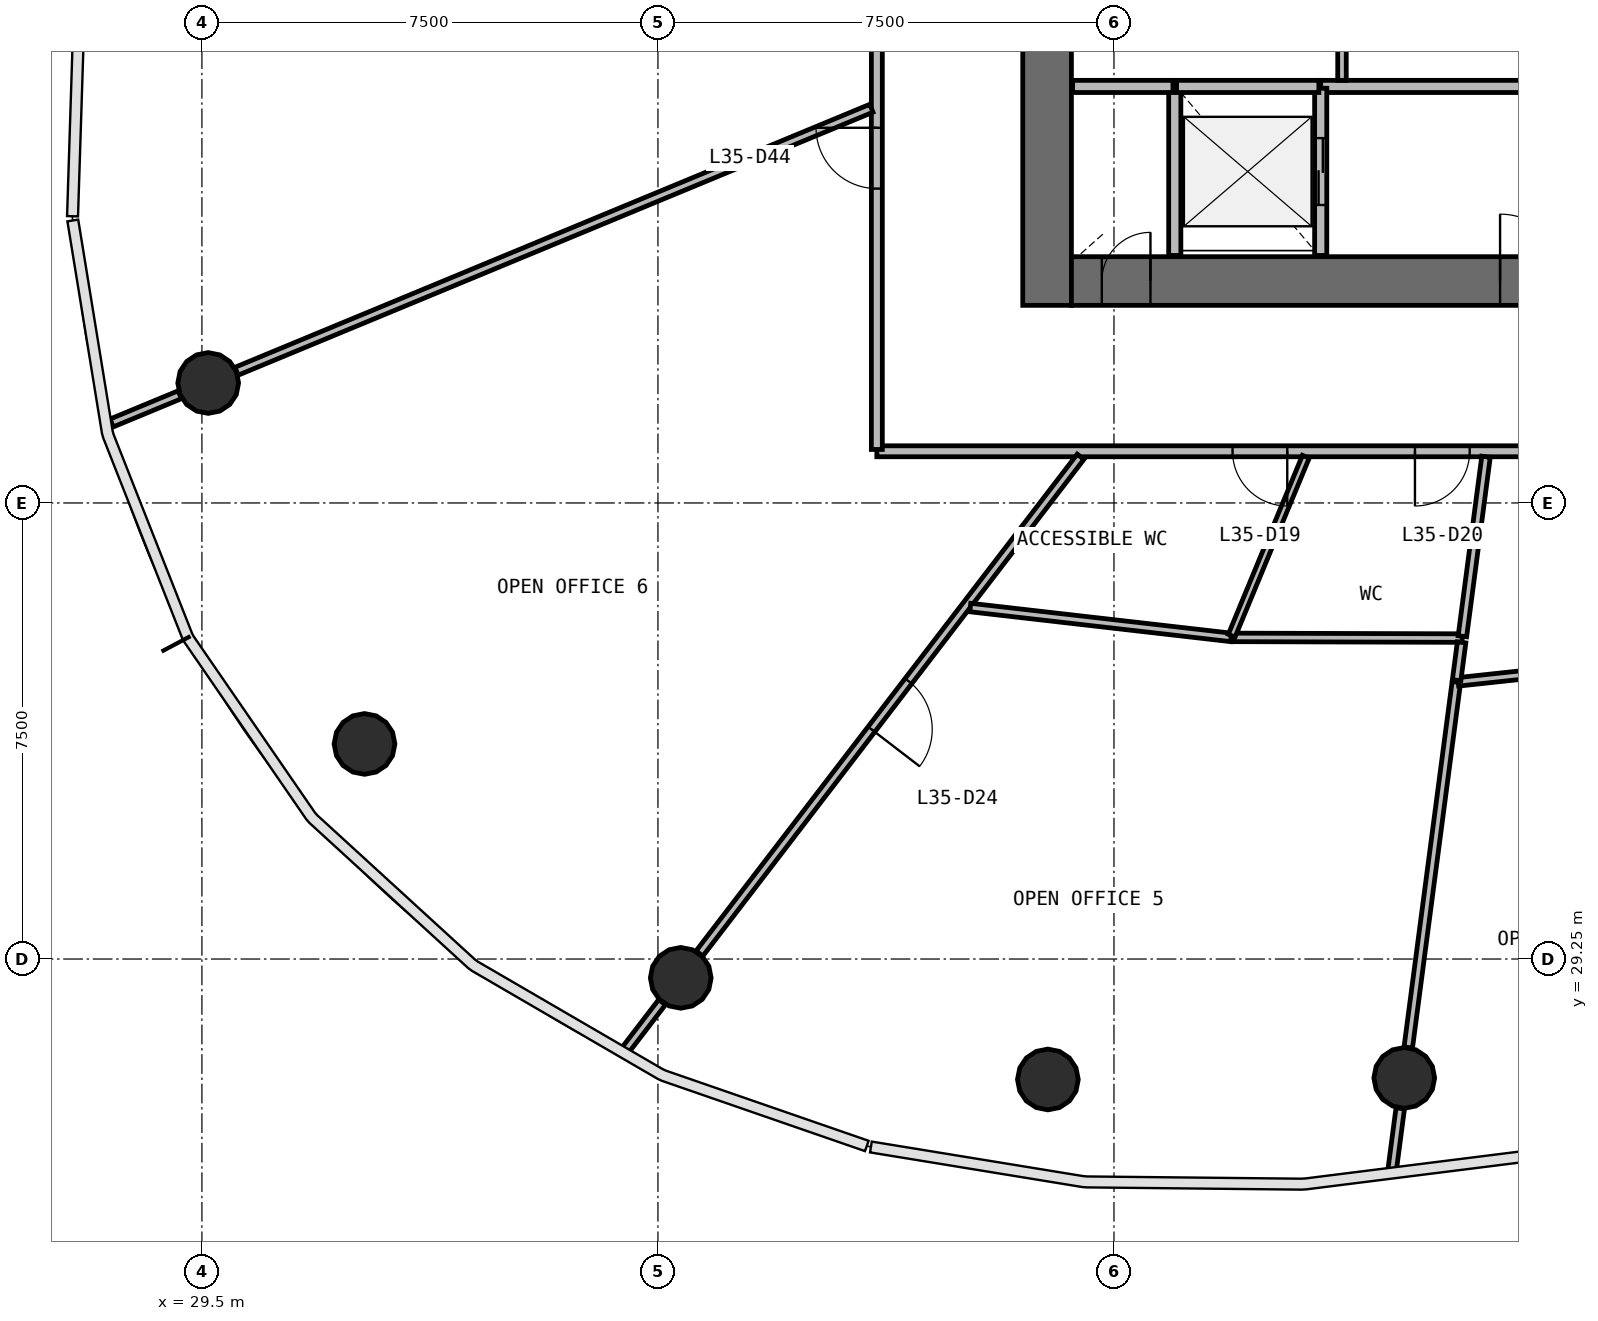
"""IFC4 building model, lengths in metres.
Left out: names, types, materials, properties, quantities, classifications, styles, units other than length and angle.
Written with IfcOpenShell. Run it as: python <this file> out.ifc"""

import sys

from ifc_helpers import new_model, si_unit, direction, frame, frame_2d, origin, origin_2d, place, context, subcontext, project, spatial, rectangle, circle, extrude, source, transform, mapped, element, fill, save


model = new_model("IFC4")
c1 = context("Model", 3, precision=1e-05, world=origin(), true_north=direction((0.0, 1.0)))
c2 = subcontext(c1, "Body", "Model", "MODEL_VIEW")
j1 = project(units=[si_unit("LENGTHUNIT", "METRE"), si_unit("PLANEANGLEUNIT", "RADIAN")], contexts=[c1])
p1 = place(None, origin())
s1 = spatial("IfcSite", under=j1, at=p1, CompositionType="ELEMENT")
p2 = place(p1, origin())
s2 = spatial("IfcBuilding", under=s1, at=p2, CompositionType="ELEMENT")
p3 = place(p2, frame((0.0, 0.0, 148.7)))
s3 = spatial("IfcBuildingStorey", under=s2, at=p3, CompositionType="ELEMENT", Elevation=148.7)
p4 = place(p3, frame((43.4, 56.0, 0.0), z_axis=(0.0, 0.0, 1.0), x_axis=(0.0, -1.0, 0.0)))
e1 = element("IfcWall", 1, at=p4, inside=s3, PredefinedType="SHEAR", context=c2, shape_type="SweptSolid", body=[
    extrude(rectangle(XDim=16.0, YDim=0.8, at=frame_2d((8.0, 0.0))), origin(), (0.0, 0.0, 1.0), 3.9),
])
p5 = place(p4, frame((7.1, 0.0, 0.0)))
e2 = element("IfcOpeningElement", 2, at=p5, cuts=e1, PredefinedType="OPENING", context=c2, shape_type="SweptSolid", body=[
    extrude(rectangle(XDim=1.8, YDim=2.1, at=frame_2d((0.9, 1.05))), frame((0.0, 0.41, 0.0), z_axis=(0.0, -1.0, 0.0), x_axis=(1.0, 0.0, 0.0)), (0.0, 0.0, 1.0), 0.82),
])
p6 = place(p3, frame((43.8, 40.4, 0.0), z_axis=(0.0, 0.0, 1.0), x_axis=(1.0, 0.0, 0.0)))
e3 = element("IfcWall", 3, at=p6, inside=s3, PredefinedType="SHEAR", context=c2, shape_type="SweptSolid", body=[
    extrude(rectangle(XDim=16.4, YDim=0.8, at=frame_2d((8.2, 0.0))), origin(), (0.0, 0.0, 1.0), 3.9),
])
p7 = place(p6, frame((10.1, 0.0, 0.0)))
e4 = element("IfcOpeningElement", 4, at=p7, cuts=e3, PredefinedType="OPENING", context=c2, shape_type="SweptSolid", body=[
    extrude(rectangle(XDim=1.2, YDim=2.1, at=frame_2d((0.6, 1.05))), frame((0.0, 0.41, 0.0), z_axis=(0.0, -1.0, 0.0), x_axis=(1.0, 0.0, 0.0)), (0.0, 0.0, 1.0), 0.82),
])
p8 = place(p6, frame((7.05, 0.0, 0.0)))
e5 = element("IfcOpeningElement", 5, at=p8, cuts=e3, PredefinedType="OPENING", context=c2, shape_type="SweptSolid", body=[
    extrude(rectangle(XDim=1.1, YDim=2.1, at=frame_2d((0.55, 1.05))), frame((0.0, 0.41, 0.0), z_axis=(0.0, -1.0, 0.0), x_axis=(1.0, 0.0, 0.0)), (0.0, 0.0, 1.0), 0.82),
])
p9 = place(p6, frame((0.5, 0.0, 0.0)))
e6 = element("IfcOpeningElement", 6, at=p9, cuts=e3, PredefinedType="OPENING", context=c2, shape_type="SweptSolid", body=[
    extrude(rectangle(XDim=0.8, YDim=2.1, at=frame_2d((0.4, 1.05))), frame((0.0, 0.41, 0.0), z_axis=(0.0, -1.0, 0.0), x_axis=(1.0, 0.0, 0.0)), (0.0, 0.0, 1.0), 0.82),
])
m1 = source(origin(), c2, "Body", "SweptSolid", [
    extrude(circle(Radius=0.5, at=origin_2d()), origin(), (0.0, 0.0, 1.0), 3.9),
])
for number, where, z_axis, x_axis in (
    (7, (29.603, 38.723, 0.0), (0.0, 0.0, 1.0), (1.0, 0.0, 0.0)),
    (8, (32.174, 32.787, 0.0), (0.0, 0.0, 1.0), (1.0, 0.0, 0.0)),
    (9, (37.375, 28.94, 0.0), (0.0, 0.0, 1.0), (1.0, 0.0, 0.0)),
    (10, (43.413, 27.269, 0.0), (0.0, 0.0, 1.0), (1.0, 0.0, 0.0)),
    (11, (49.274, 27.295, 0.0), (0.0, 0.0, 1.0), (1.0, 0.0, 0.0)),
):
    element("IfcColumn", number, at=place(p3, frame(where, z_axis=z_axis, x_axis=x_axis)), inside=s3, PredefinedType="COLUMN", context=c2, shape_type="MappedRepresentation", body=[
        mapped(m1, transform((0.0, 0.0, 0.0), scale=1.0)),
    ])
p10 = place(p3, frame((52.7, 43.6, 0.0), z_axis=(0.0, 0.0, 1.0), x_axis=(-1.0, 0.0, 0.0)))
e12 = element("IfcWall", 12, at=p10, inside=s3, PredefinedType="SOLIDWALL", context=c2, shape_type="SweptSolid", body=[
    extrude(rectangle(XDim=4.8, YDim=0.2, at=frame_2d((2.4, 0.0))), origin(), (0.0, 0.0, 1.0), 3.58),
])
p11 = place(p3, frame((45.5, 43.6, 0.0), z_axis=(0.0, 0.0, 1.0), x_axis=(0.0, -1.0, 0.0)))
e13 = element("IfcWall", 13, at=p11, inside=s3, PredefinedType="SOLIDWALL", context=c2, shape_type="SweptSolid", body=[
    extrude(rectangle(XDim=2.78, YDim=0.2, at=frame_2d((1.39, 0.0))), origin(), (0.0, 0.0, 1.0), 3.58),
])
p12 = place(p3, frame((47.9, 40.82, 0.0), z_axis=(0.0, 0.0, 1.0), x_axis=(0.0, 1.0, 0.0)))
e14 = element("IfcWall", 14, at=p12, inside=s3, PredefinedType="SOLIDWALL", context=c2, shape_type="SweptSolid", body=[
    extrude(rectangle(XDim=2.75, YDim=0.2, at=frame_2d((1.375, 0.0))), origin(), (0.0, 0.0, 1.0), 3.58),
])
p13 = place(p12, frame((0.83, 0.0, 0.0)))
e15 = element("IfcOpeningElement", 15, at=p13, cuts=e14, PredefinedType="OPENING", context=c2, shape_type="SweptSolid", body=[
    extrude(rectangle(XDim=1.1, YDim=2.1, at=frame_2d((0.55, 1.05))), frame((0.0, 0.11, 0.0), z_axis=(0.0, -1.0, 0.0), x_axis=(1.0, 0.0, 0.0)), (0.0, 0.0, 1.0), 0.22),
])
p14 = place(p3, frame((47.87, 43.6, 0.0), z_axis=(0.0, 0.0, 1.0), x_axis=(-1.0, 0.0, 0.0)))
e16 = element("IfcWall", 16, at=p14, inside=s3, PredefinedType="SOLIDWALL", context=c2, shape_type="SweptSolid", body=[
    extrude(rectangle(XDim=2.34, YDim=0.2, at=frame_2d((1.17, 0.0))), origin(), (0.0, 0.0, 1.0), 3.58),
])
p15 = place(p3, frame((45.47, 43.6, 0.0), z_axis=(0.0, 0.0, 1.0), x_axis=(-1.0, 0.0, 0.0)))
e17 = element("IfcWall", 17, at=p15, inside=s3, PredefinedType="SOLIDWALL", context=c2, shape_type="SweptSolid", body=[
    extrude(rectangle(XDim=1.65, YDim=0.2, at=frame_2d((0.825, 0.0))), origin(), (0.0, 0.0, 1.0), 3.58),
])
p16 = place(p3, frame((63.4, 37.6, 0.0), z_axis=(0.0, 0.0, 1.0), x_axis=(-1.0, 0.0, 0.0)))
e18 = element("IfcWall", 18, at=p16, inside=s3, PredefinedType="PARTITIONING", context=c2, shape_type="SweptSolid", body=[
    extrude(rectangle(XDim=22.8, YDim=0.18, at=frame_2d((11.4, 0.0))), origin(), (0.0, 0.0, 1.0), 2.88),
])
p17 = place(p16, frame((16.05, 0.0, 0.0)))
e19 = element("IfcOpeningElement", 19, at=p17, cuts=e18, PredefinedType="OPENING", context=c2, shape_type="SweptSolid", body=[
    extrude(rectangle(XDim=0.9, YDim=2.1, at=frame_2d((0.45, 1.05))), frame((0.0, 0.1, 0.0), z_axis=(0.0, -1.0, 0.0), x_axis=(1.0, 0.0, 0.0)), (0.0, 0.0, 1.0), 0.2),
])
p18 = place(p16, frame((13.05, 0.0, 0.0)))
e20 = element("IfcOpeningElement", 20, at=p18, cuts=e18, PredefinedType="OPENING", context=c2, shape_type="SweptSolid", body=[
    extrude(rectangle(XDim=0.9, YDim=2.1, at=frame_2d((0.45, 1.05))), frame((0.0, 0.1, 0.0), z_axis=(0.0, -1.0, 0.0), x_axis=(1.0, 0.0, 0.0)), (0.0, 0.0, 1.0), 0.2),
])
p19 = place(p16, frame((10.95, 0.0, 0.0)))
e21 = element("IfcOpeningElement", 21, at=p19, cuts=e18, PredefinedType="OPENING", context=c2, shape_type="SweptSolid", body=[
    extrude(rectangle(XDim=1.0, YDim=2.1, at=frame_2d((0.5, 1.05))), frame((0.0, 0.1, 0.0), z_axis=(0.0, -1.0, 0.0), x_axis=(1.0, 0.0, 0.0)), (0.0, 0.0, 1.0), 0.2),
])
p20 = place(p16, frame((5.75, 0.0, 0.0)))
e22 = element("IfcOpeningElement", 22, at=p20, cuts=e18, PredefinedType="OPENING", context=c2, shape_type="SweptSolid", body=[
    extrude(rectangle(XDim=1.0, YDim=2.1, at=frame_2d((0.5, 1.05))), frame((0.0, 0.1, 0.0), z_axis=(0.0, -1.0, 0.0), x_axis=(1.0, 0.0, 0.0)), (0.0, 0.0, 1.0), 0.2),
])
p21 = place(p3, frame((40.6, 37.63, 0.0), z_axis=(0.0, 0.0, 1.0), x_axis=(0.0, 1.0, 0.0)))
e23 = element("IfcWall", 23, at=p21, inside=s3, PredefinedType="PARTITIONING", context=c2, shape_type="SweptSolid", body=[
    extrude(rectangle(XDim=20.74, YDim=0.18, at=frame_2d((10.37, 0.0))), origin(), (0.0, 0.0, 1.0), 2.88),
])
p22 = place(p21, frame((15.49, 0.0, 0.0)))
e24 = element("IfcOpeningElement", 24, at=p22, cuts=e23, PredefinedType="OPENING", context=c2, shape_type="SweptSolid", body=[
    extrude(rectangle(XDim=1.0, YDim=2.1, at=frame_2d((0.5, 1.05))), frame((0.0, 0.1, 0.0), z_axis=(0.0, -1.0, 0.0), x_axis=(1.0, 0.0, 0.0)), (0.0, 0.0, 1.0), 0.2),
])
p23 = place(p21, frame((12.09, 0.0, 0.0)))
e25 = element("IfcOpeningElement", 25, at=p23, cuts=e23, PredefinedType="OPENING", context=c2, shape_type="SweptSolid", body=[
    extrude(rectangle(XDim=1.0, YDim=2.1, at=frame_2d((0.5, 1.05))), frame((0.0, 0.1, 0.0), z_axis=(0.0, -1.0, 0.0), x_axis=(1.0, 0.0, 0.0)), (0.0, 0.0, 1.0), 0.2),
])
p24 = place(p21, frame((9.89, 0.0, 0.0)))
e26 = element("IfcOpeningElement", 26, at=p24, cuts=e23, PredefinedType="OPENING", context=c2, shape_type="SweptSolid", body=[
    extrude(rectangle(XDim=1.0, YDim=2.1, at=frame_2d((0.5, 1.05))), frame((0.0, 0.1, 0.0), z_axis=(0.0, -1.0, 0.0), x_axis=(1.0, 0.0, 0.0)), (0.0, 0.0, 1.0), 0.2),
])
p25 = place(p21, frame((4.29, 0.0, 0.0)))
e27 = element("IfcOpeningElement", 27, at=p25, cuts=e23, PredefinedType="OPENING", context=c2, shape_type="SweptSolid", body=[
    extrude(rectangle(XDim=1.0, YDim=2.1, at=frame_2d((0.5, 1.05))), frame((0.0, 0.1, 0.0), z_axis=(0.0, -1.0, 0.0), x_axis=(1.0, 0.0, 0.0)), (0.0, 0.0, 1.0), 0.2),
])
p26 = place(p3, frame((40.51, 43.241, 0.0), z_axis=(0.0, 0.0, 1.0), x_axis=(-0.923879643786, -0.382683163725, 0.0)))
e28 = element("IfcWall", 28, at=p26, inside=s3, PredefinedType="PARTITIONING", context=c2, shape_type="SweptSolid", body=[
    extrude(rectangle(XDim=11.3, YDim=0.14, at=frame_2d((5.65, 0.0))), origin(), (0.0, 0.0, 1.0), 2.88),
])
p27 = place(p3, frame((43.951, 37.51, 0.0), z_axis=(0.0, 0.0, 1.0), x_axis=(-0.608768467527, -0.793347939396, 0.0)))
e29 = element("IfcWall", 29, at=p27, inside=s3, PredefinedType="PARTITIONING", context=c2, shape_type="SweptSolid", body=[
    extrude(rectangle(XDim=10.297, YDim=0.14, at=frame_2d((5.148, 0.0))), origin(), (0.0, 0.0, 1.0), 2.88),
])
p28 = place(p27, frame((4.65, 0.0, 0.0)))
e30 = element("IfcOpeningElement", 30, at=p28, cuts=e29, PredefinedType="OPENING", context=c2, shape_type="SweptSolid", body=[
    extrude(rectangle(XDim=1.0, YDim=2.1, at=frame_2d((0.5, 1.05))), frame((0.0, 0.08, 0.0), z_axis=(0.0, -1.0, 0.0), x_axis=(1.0, 0.0, 0.0)), (0.0, 0.0, 1.0), 0.16),
])
p29 = place(p3, frame((50.131, 33.805, 0.0), z_axis=(0.0, 0.0, 1.0), x_axis=(-0.130525353545, -0.991444971787, 0.0)))
e31 = element("IfcWall", 31, at=p29, inside=s3, PredefinedType="PARTITIONING", context=c2, shape_type="SweptSolid", body=[
    extrude(rectangle(XDim=6.062, YDim=0.14, at=frame_2d((3.031, 0.0))), origin(), (0.0, 0.0, 1.0), 2.88),
])
p30 = place(p3, frame((42.136, 35.031, 0.0), z_axis=(0.0, 0.0, 1.0), x_axis=(0.993502737761, -0.113808216145, 0.0)))
e32 = element("IfcWall", 32, at=p30, inside=s3, PredefinedType="PARTITIONING", context=c2, shape_type="SweptSolid", body=[
    extrude(rectangle(XDim=4.316, YDim=0.14, at=frame_2d((2.158, 0.0))), origin(), (0.0, 0.0, 1.0), 2.88),
])
p31 = place(p3, frame((46.454, 34.539, 0.0), z_axis=(0.0, 0.0, 1.0), x_axis=(0.999995567734, -0.002977333082, 0.0)))
e33 = element("IfcWall", 33, at=p31, inside=s3, PredefinedType="PARTITIONING", context=c2, shape_type="SweptSolid", body=[
    extrude(rectangle(XDim=3.772, YDim=0.14, at=frame_2d((1.886, 0.0))), origin(), (0.0, 0.0, 1.0), 2.88),
])
p32 = place(p3, frame((53.787, 34.199, 0.0), z_axis=(0.0, 0.0, 1.0), x_axis=(-0.994246424416, -0.107116980612, 0.0)))
e34 = element("IfcWall", 34, at=p32, inside=s3, PredefinedType="PARTITIONING", context=c2, shape_type="SweptSolid", body=[
    extrude(rectangle(XDim=3.647, YDim=0.14, at=frame_2d((1.823, 0.0))), origin(), (0.0, 0.0, 1.0), 2.88),
])
p33 = place(p32, frame((1.397, 0.0, 0.0)))
e35 = element("IfcOpeningElement", 35, at=p33, cuts=e34, PredefinedType="OPENING", context=c2, shape_type="SweptSolid", body=[
    extrude(rectangle(XDim=1.0, YDim=2.1, at=frame_2d((0.5, 1.05))), frame((0.0, 0.08, 0.0), z_axis=(0.0, -1.0, 0.0), x_axis=(1.0, 0.0, 0.0)), (0.0, 0.0, 1.0), 0.16),
])
p34 = place(p3, frame((50.619, 37.51, 0.0), z_axis=(0.0, 0.0, 1.0), x_axis=(-0.130520256622, -0.991445642792, 0.0)))
e36 = element("IfcWall", 36, at=p34, inside=s3, PredefinedType="PARTITIONING", context=c2, shape_type="SweptSolid", body=[
    extrude(rectangle(XDim=2.978, YDim=0.14, at=frame_2d((1.489, 0.0))), origin(), (0.0, 0.0, 1.0), 2.88),
])
p35 = place(p3, frame((48.25, 43.7, 0.0), z_axis=(0.0, 0.0, 1.0), x_axis=(0.0, 1.0, 0.0)))
e37 = element("IfcWall", 37, at=p35, inside=s3, PredefinedType="PARTITIONING", context=c2, shape_type="SweptSolid", body=[
    extrude(rectangle(XDim=2.29, YDim=0.14, at=frame_2d((1.145, 0.0))), origin(), (0.0, 0.0, 1.0), 2.88),
])
p36 = place(p3, frame((29.137, 38.53, 0.0), z_axis=(0.0, 0.0, 1.0), x_axis=(-0.923842754498, -0.382772210279, 0.0)))
e38 = element("IfcWall", 38, at=p36, inside=s3, PredefinedType="PARTITIONING", context=c2, shape_type="SweptSolid", body=[
    extrude(rectangle(XDim=1.214, YDim=0.14, at=frame_2d((0.607, 0.0))), origin(), (0.0, 0.0, 1.0), 2.88),
])
p37 = place(p3, frame((49.208, 26.795, 0.0), z_axis=(0.0, 0.0, 1.0), x_axis=(-0.130609492545, -0.991433891118, 0.0)))
e39 = element("IfcWall", 39, at=p37, inside=s3, PredefinedType="PARTITIONING", context=c2, shape_type="SweptSolid", body=[
    extrude(rectangle(XDim=1.019, YDim=0.14, at=frame_2d((0.509, 0.0))), origin(), (0.0, 0.0, 1.0), 2.88),
])
p38 = place(p3, frame((37.068, 28.54, 0.0), z_axis=(0.0, 0.0, 1.0), x_axis=(-0.608854774338, -0.793281705175, 0.0)))
e40 = element("IfcWall", 40, at=p38, inside=s3, PredefinedType="PARTITIONING", context=c2, shape_type="SweptSolid", body=[
    extrude(rectangle(XDim=0.993, YDim=0.14, at=frame_2d((0.497, 0.0))), origin(), (0.0, 0.0, 1.0), 2.88),
])
p39 = place(p3, frame((50.217, 34.458, 0.0), z_axis=(0.0, 0.0, 1.0), x_axis=(-0.130916756961, -0.991393364284, 0.0)))
e41 = element("IfcWall", 41, at=p39, inside=s3, PredefinedType="PARTITIONING", context=c2, shape_type="SweptSolid", body=[
    extrude(rectangle(XDim=0.628, YDim=0.14, at=frame_2d((0.314, 0.0))), origin(), (0.0, 0.0, 1.0), 2.88),
])
p40 = place(p3, frame((47.655, 37.51, 0.0), z_axis=(0.0, 0.0, 1.0), x_axis=(-0.382660896845, -0.923888866707, 0.0)))
e42 = element("IfcWall", 42, at=p40, inside=s3, PredefinedType="PARTITIONING", context=c2, shape_type="SweptSolid", body=[
    extrude(rectangle(XDim=3.186, YDim=0.12, at=frame_2d((1.593, 0.0))), origin(), (0.0, 0.0, 1.0), 2.88),
])
m2 = source(origin(), c2, "Body", "SweptSolid", [
    extrude(rectangle(XDim=1.1, YDim=2.1, at=frame_2d((0.55, 1.05))), frame((0.0, 0.025, 0.0), z_axis=(0.0, -1.0, 0.0), x_axis=(1.0, 0.0, 0.0)), (0.0, 0.0, 1.0), 0.05),
])
p41 = place(p13, origin())
e43 = element("IfcDoor", 43, at=p41, inside=s3, OperationType="DOUBLE_DOOR_SLIDING", PredefinedType="USERDEFINED", context=c2, shape_type="MappedRepresentation", body=[
    mapped(m2, transform((0.0, 0.0, 0.0), scale=1.0)),
])
fill(e15, e43)
m3 = source(origin(), c2, "Body", "SweptSolid", [
    extrude(rectangle(XDim=1.1, YDim=2.1, at=frame_2d((0.55, 1.05))), frame((0.0, 0.025, 0.0), z_axis=(0.0, -1.0, 0.0), x_axis=(1.0, 0.0, 0.0)), (0.0, 0.0, 1.0), 0.05),
])
p42 = place(p8, origin())
e44 = element("IfcDoor", 44, at=p42, inside=s3, OperationType="SINGLE_SWING_LEFT", PredefinedType="DOOR", context=c2, shape_type="MappedRepresentation", body=[
    mapped(m3, transform((0.0, 0.0, 0.0), scale=1.0)),
])
fill(e5, e44)
m4 = source(origin(), c2, "Body", "SweptSolid", [
    extrude(rectangle(XDim=0.8, YDim=2.1, at=frame_2d((0.4, 1.05))), frame((0.0, 0.025, 0.0), z_axis=(0.0, -1.0, 0.0), x_axis=(1.0, 0.0, 0.0)), (0.0, 0.0, 1.0), 0.05),
])
p43 = place(p9, origin())
e45 = element("IfcDoor", 45, at=p43, inside=s3, OperationType="SINGLE_SWING_RIGHT", PredefinedType="DOOR", context=c2, shape_type="MappedRepresentation", body=[
    mapped(m4, transform((0.0, 0.0, 0.0), scale=1.0)),
])
fill(e6, e45)
m5 = source(origin(), c2, "Body", "SweptSolid", [
    extrude(rectangle(XDim=0.9, YDim=2.1, at=frame_2d((0.45, 1.05))), frame((0.0, 0.025, 0.0), z_axis=(0.0, -1.0, 0.0), x_axis=(1.0, 0.0, 0.0)), (0.0, 0.0, 1.0), 0.05),
])
p44 = place(p17, origin())
e46 = element("IfcDoor", 46, at=p44, inside=s3, OperationType="SINGLE_SWING_LEFT", PredefinedType="DOOR", context=c2, shape_type="MappedRepresentation", body=[
    mapped(m5, transform((0.0, 0.0, 0.0), scale=1.0)),
])
fill(e19, e46)
p45 = place(p18, origin())
e47 = element("IfcDoor", 47, at=p45, inside=s3, OperationType="SINGLE_SWING_RIGHT", PredefinedType="DOOR", context=c2, shape_type="MappedRepresentation", body=[
    mapped(m5, transform((0.0, 0.0, 0.0), scale=1.0)),
])
fill(e20, e47)
m6 = source(origin(), c2, "Body", "SweptSolid", [
    extrude(rectangle(XDim=1.0, YDim=2.1, at=frame_2d((0.5, 1.05))), frame((0.0, 0.025, 0.0), z_axis=(0.0, -1.0, 0.0), x_axis=(1.0, 0.0, 0.0)), (0.0, 0.0, 1.0), 0.05),
])
p46 = place(p28, origin())
e48 = element("IfcDoor", 48, at=p46, inside=s3, OperationType="SINGLE_SWING_RIGHT", PredefinedType="DOOR", context=c2, shape_type="MappedRepresentation", body=[
    mapped(m6, transform((0.0, 0.0, 0.0), scale=1.0)),
])
fill(e30, e48)
p47 = place(p25, origin())
e49 = element("IfcDoor", 49, at=p47, inside=s3, OperationType="SINGLE_SWING_RIGHT", PredefinedType="DOOR", context=c2, shape_type="MappedRepresentation", body=[
    mapped(m6, transform((0.0, 0.0, 0.0), scale=1.0)),
])
fill(e27, e49)
save(model, sys.argv[1])
